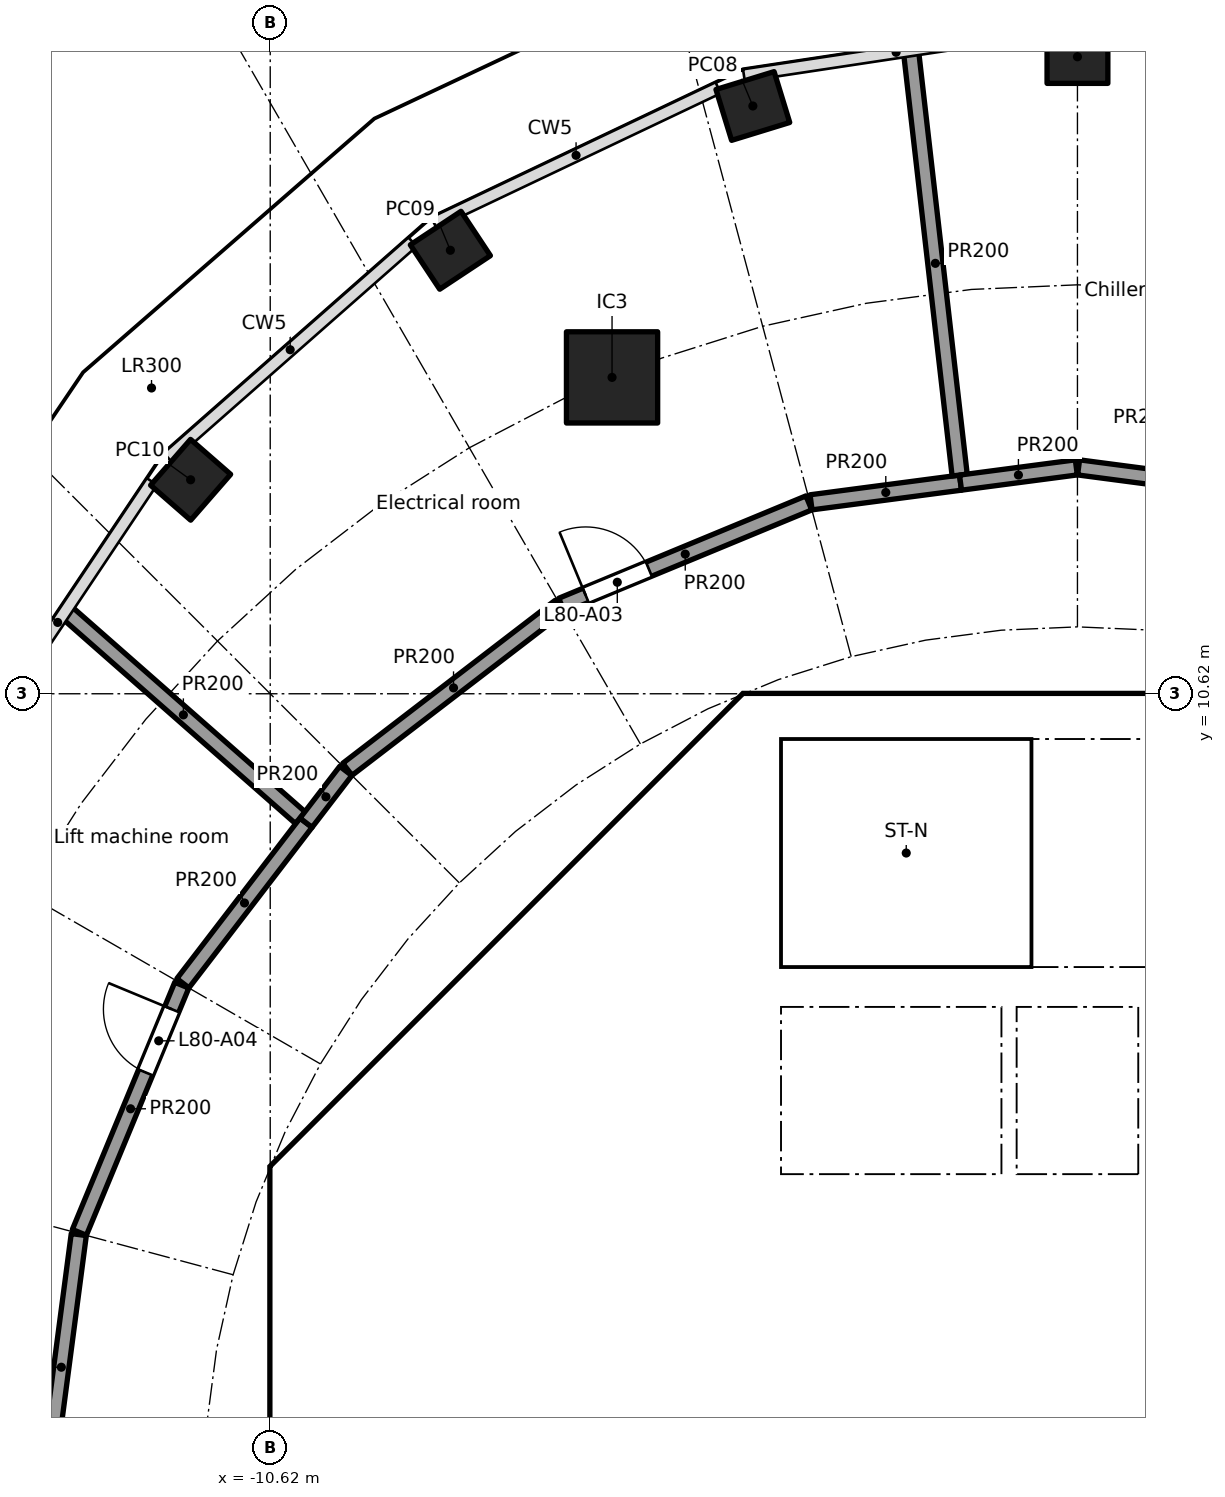
"""IFC4 building model, lengths in metres.
Left out: names, types, materials, properties, quantities, classifications, styles, units other than length and angle.
Written with IfcOpenShell. Run it as: python <this file> out.ifc"""

import sys

from ifc_helpers import new_model, si_unit, direction, frame, frame_2d, origin, origin_2d, place, context, subcontext, project, spatial, polyline, rectangle, hollow_rectangle, outline, extrude, element, fill, save


model = new_model("IFC4")
c1 = context("Model", 3, precision=1e-05, world=origin(), true_north=direction((0.0, 1.0)))
c2 = subcontext(c1, "Body", "Model", "MODEL_VIEW")
j1 = project(units=[si_unit("LENGTHUNIT", "METRE"), si_unit("PLANEANGLEUNIT", "RADIAN")], contexts=[c1])
p1 = place(None, origin())
s1 = spatial("IfcSite", under=j1, at=p1, CompositionType="ELEMENT")
p2 = place(p1, origin())
s2 = spatial("IfcBuilding", under=s1, at=p2, CompositionType="ELEMENT")
p3 = place(p2, frame((0.0, 0.0, 324.9)))
s3 = spatial("IfcBuildingStorey", under=s2, at=p3, CompositionType="ELEMENT", Elevation=324.9)
for number, where, z_axis, x_axis in (
    (1, (0.0, 19.0, 0.0), (0.0, 0.0, 1.0), (-1.0, 0.0, 0.0)),
    (2, (-4.271, 18.353, 0.0), (0.0, 0.0, 1.0), (-0.956, -0.294, 0.0)),
    (3, (-8.25, 16.455, 0.0), (0.0, 0.0, 1.0), (-0.834, -0.552, 0.0)),
    (4, (-11.667, 13.435, 0.0), (0.0, 0.0, 1.0), (-0.657, -0.754, 0.0)),
):
    element("IfcColumn", number, at=place(p3, frame(where, z_axis=z_axis, x_axis=x_axis)), inside=s3, PredefinedType="COLUMN", context=c2, shape_type="SweptSolid", body=[
        extrude(hollow_rectangle(XDim=0.8, YDim=0.7, WallThickness=0.025, at=origin_2d()), origin(), (0.0, 0.0, 1.0), 4.0),
    ])
p4 = place(p3, frame((-6.123, 14.782, 0.0), z_axis=(0.0, 0.0, 1.0), x_axis=(1.0, 0.0, 0.0)))
e5 = element("IfcColumn", 5, at=p4, inside=s3, PredefinedType="COLUMN", context=c2, shape_type="SweptSolid", body=[
    extrude(rectangle(XDim=1.2, YDim=1.2, at=origin_2d()), origin(), (0.0, 0.0, 1.0), 4.0),
])
p5 = place(p3, frame((-4.613, 9.988, 0.0), z_axis=(0.0, 0.0, 1.0), x_axis=(-0.707106781187, -0.707106781187, 0.0)))
e6 = element("IfcWall", 6, at=p5, inside=s3, PredefinedType="SHEAR", context=c2, shape_type="SweptSolid", body=[
    extrude(rectangle(XDim=7.602, YDim=0.6, at=frame_2d((3.801, 0.0))), origin(), (0.0, 0.0, 1.0), 3.7),
])
p6 = place(p5, frame((0.351, 0.0, 0.0)))
e7 = element("IfcOpeningElement", 7, at=p6, cuts=e6, PredefinedType="OPENING", context=c2, shape_type="SweptSolid", body=[
    extrude(rectangle(XDim=1.1, YDim=2.1, at=frame_2d((0.55, 1.05))), frame((0.0, 0.31, 0.0), z_axis=(0.0, -1.0, 0.0), x_axis=(1.0, 0.0, 0.0)), (0.0, 0.0, 1.0), 0.62),
])
p7 = place(p3, frame((-10.325, 3.801, 0.0), z_axis=(0.0, 0.0, 1.0), x_axis=(0.0, -1.0, 0.0)))
e8 = element("IfcWall", 8, at=p7, inside=s3, PredefinedType="SHEAR", context=c2, shape_type="SweptSolid", body=[
    extrude(rectangle(XDim=7.602, YDim=0.6, at=frame_2d((3.801, 0.0))), origin(), (0.0, 0.0, 1.0), 3.7),
])
p8 = place(p7, frame((0.651, 0.0, 0.0)))
e9 = element("IfcOpeningElement", 9, at=p8, cuts=e8, PredefinedType="OPENING", context=c2, shape_type="SweptSolid", body=[
    extrude(rectangle(XDim=1.5, YDim=2.1, at=frame_2d((0.75, 1.05))), frame((0.0, 0.31, 0.0), z_axis=(0.0, -1.0, 0.0), x_axis=(1.0, 0.0, 0.0)), (0.0, 0.0, 1.0), 0.62),
])
p9 = place(p7, frame((5.451, 0.0, 0.0)))
e10 = element("IfcOpeningElement", 10, at=p9, cuts=e8, PredefinedType="OPENING", context=c2, shape_type="SweptSolid", body=[
    extrude(rectangle(XDim=1.5, YDim=2.1, at=frame_2d((0.75, 1.05))), frame((0.0, 0.31, 0.0), z_axis=(0.0, -1.0, 0.0), x_axis=(1.0, 0.0, 0.0)), (0.0, 0.0, 1.0), 0.62),
])
p10 = place(p3, frame((-5.8, 4.3, 0.0), z_axis=(0.0, 0.0, 1.0), x_axis=(0.0, 1.0, 0.0)))
e11 = element("IfcWall", 11, at=p10, inside=s3, PredefinedType="PARTITIONING", context=c2, shape_type="SweptSolid", body=[
    extrude(rectangle(XDim=3.927, YDim=0.15, at=frame_2d((1.963, 0.0))), origin(), (0.0, 0.0, 1.0), 3.7),
])
p11 = place(p10, frame((0.262, 0.0, 0.0)))
e12 = element("IfcOpeningElement", 12, at=p11, cuts=e11, PredefinedType="OPENING", context=c2, shape_type="SweptSolid", body=[
    extrude(rectangle(XDim=0.9, YDim=2.1, at=frame_2d((0.45, 1.05))), frame((0.0, 0.085, 0.0), z_axis=(0.0, -1.0, 0.0), x_axis=(1.0, 0.0, 0.0)), (0.0, 0.0, 1.0), 0.17),
])
p12 = place(p10, frame((2.338, 0.0, 0.0)))
e13 = element("IfcOpeningElement", 13, at=p12, cuts=e11, PredefinedType="OPENING", context=c2, shape_type="SweptSolid", body=[
    extrude(rectangle(XDim=0.9, YDim=2.1, at=frame_2d((0.45, 1.05))), frame((0.0, 0.085, 0.0), z_axis=(0.0, -1.0, 0.0), x_axis=(1.0, 0.0, 0.0)), (0.0, 0.0, 1.0), 0.17),
])
p13 = place(p3, frame((-4.0, 4.3, 0.0), z_axis=(0.0, 0.0, 1.0), x_axis=(0.0, 1.0, 0.0)))
e14 = element("IfcWall", 14, at=p13, inside=s3, PredefinedType="SOLIDWALL", context=c2, shape_type="SweptSolid", body=[
    extrude(rectangle(XDim=2.2, YDim=0.2, at=frame_2d((1.1, 0.0))), origin(), (0.0, 0.0, 1.0), 3.7),
])
p14 = place(p13, frame((0.55, 0.0, 0.0)))
e15 = element("IfcOpeningElement", 15, at=p14, cuts=e14, PredefinedType="OPENING", context=c2, shape_type="SweptSolid", body=[
    extrude(rectangle(XDim=1.1, YDim=2.1, at=frame_2d((0.55, 1.05))), frame((0.0, 0.11, 0.0), z_axis=(0.0, -1.0, 0.0), x_axis=(1.0, 0.0, 0.0)), (0.0, 0.0, 1.0), 0.22),
])
p15 = place(p3, frame((-6.7, 2.0, 0.0), z_axis=(0.0, 0.0, 1.0), x_axis=(1.0, 0.0, 0.0)))
e16 = element("IfcWall", 16, at=p15, inside=s3, PredefinedType="SOLIDWALL", context=c2, shape_type="SweptSolid", body=[
    extrude(rectangle(XDim=13.4, YDim=0.2, at=frame_2d((6.7, 0.0))), origin(), (0.0, 0.0, 1.0), 3.7),
])
p16 = place(p15, frame((1.85, 0.0, 0.0)))
e17 = element("IfcOpeningElement", 17, at=p16, cuts=e16, PredefinedType="OPENING", context=c2, shape_type="SweptSolid", body=[
    extrude(rectangle(XDim=0.9, YDim=2.1, at=frame_2d((0.45, 1.05))), frame((0.0, 0.11, 0.0), z_axis=(0.0, -1.0, 0.0), x_axis=(1.0, 0.0, 0.0)), (0.0, 0.0, 1.0), 0.22),
])
p17 = place(p15, frame((5.15, 0.0, 0.0)))
e18 = element("IfcOpeningElement", 18, at=p17, cuts=e16, PredefinedType="OPENING", context=c2, shape_type="SweptSolid", body=[
    extrude(rectangle(XDim=0.9, YDim=2.1, at=frame_2d((0.45, 1.05))), frame((0.0, 0.11, 0.0), z_axis=(0.0, -1.0, 0.0), x_axis=(1.0, 0.0, 0.0)), (0.0, 0.0, 1.0), 0.22),
])
p18 = place(p15, frame((8.45, 0.0, 0.0)))
e19 = element("IfcOpeningElement", 19, at=p18, cuts=e16, PredefinedType="OPENING", context=c2, shape_type="SweptSolid", body=[
    extrude(rectangle(XDim=0.9, YDim=2.1, at=frame_2d((0.45, 1.05))), frame((0.0, 0.11, 0.0), z_axis=(0.0, -1.0, 0.0), x_axis=(1.0, 0.0, 0.0)), (0.0, 0.0, 1.0), 0.22),
])
p19 = place(p3, origin())
e20 = element("IfcWall", 20, at=p19, inside=s3, PredefinedType="SHEAR", context=c2, shape_type="SweptSolid", body=[
    extrude(outline(polyline([(-10.2, 4.825), (-9.776, 4.401), (-10.025, 4.152), (-10.025, 3.801), (-10.625, 3.801), (-10.625, 4.401), (-10.2, 4.825)])), origin(), (0.0, 0.0, 1.0), 3.7),
])
p20 = place(p3, origin())
e21 = element("IfcWall", 21, at=p20, inside=s3, PredefinedType="SHEAR", context=c2, shape_type="SweptSolid", body=[
    extrude(outline(polyline([(-4.152, 10.025), (-4.401, 9.776), (-4.825, 10.2), (-4.401, 10.625), (4.401, 10.625), (4.825, 10.2), (4.401, 9.776), (4.152, 10.025), (-4.152, 10.025)])), origin(), (0.0, 0.0, 1.0), 3.7),
])
p21 = place(p3, frame((-10.025, 4.0, 0.0), z_axis=(0.0, 0.0, 1.0), x_axis=(1.0, 0.0, 0.0)))
e22 = element("IfcWall", 22, at=p21, inside=s3, PredefinedType="PARTITIONING", context=c2, shape_type="SweptSolid", body=[
    extrude(rectangle(XDim=3.325, YDim=0.2, at=frame_2d((1.662, 0.0))), origin(), (0.0, 0.0, 1.0), 3.7),
])
p22 = place(p3, frame((-8.301, 5.8, 0.0), z_axis=(0.0, 0.0, 1.0), x_axis=(1.0, 0.0, 0.0)))
e23 = element("IfcWall", 23, at=p22, inside=s3, PredefinedType="PARTITIONING", context=c2, shape_type="SweptSolid", body=[
    extrude(rectangle(XDim=2.426, YDim=0.15, at=frame_2d((1.213, 0.0))), origin(), (0.0, 0.0, 1.0), 3.7),
])
for number, where, z_axis, x_axis in (
    (24, (-0.9, 4.3, 0.0), (0.0, 0.0, 1.0), (0.0, 1.0, 0.0)),
    (25, (0.9, 4.3, 0.0), (0.0, 0.0, 1.0), (0.0, 1.0, 0.0)),
):
    element("IfcWall", number, at=place(p3, frame(where, z_axis=z_axis, x_axis=x_axis)), inside=s3, PredefinedType="SOLIDWALL", context=c2, shape_type="SweptSolid", body=[
        extrude(rectangle(XDim=2.2, YDim=0.2, at=frame_2d((1.1, 0.0))), origin(), (0.0, 0.0, 1.0), 3.7),
    ])
p23 = place(p3, origin())
e26 = element("IfcWall", 26, at=p23, inside=s3, PredefinedType="SOLIDWALL", context=c2, shape_type="SweptSolid", body=[
    extrude(outline(polyline([(-6.7, 4.3), (6.7, 4.3), (6.7, 2.1), (6.5, 2.1), (6.5, 4.1), (4.5, 4.1), (4.5, 2.1), (4.3, 2.1), (4.3, 4.1), (0.1, 4.1), (0.1, 2.1), (-0.1, 2.1), (-0.1, 4.1), (-2.1, 4.1), (-2.1, 2.1), (-2.3, 2.1), (-2.3, 4.1), (-6.5, 4.1), (-6.5, 2.1), (-6.7, 2.1), (-6.7, 4.3)])), origin(), (0.0, 0.0, 1.0), 3.7),
])
p24 = place(p3, origin())
e27 = element("IfcWall", 27, at=p24, inside=s3, PredefinedType="SOLIDWALL", context=c2, shape_type="SweptSolid", body=[
    extrude(outline(polyline([(-3.9, 7.025), (-4.1, 7.025), (-4.1, 10.025), (-3.9, 10.025), (-3.9, 7.025)])), origin(), (0.0, 0.0, 1.0), 3.7),
])
p25 = place(p3, origin())
e28 = element("IfcWall", 28, at=p25, inside=s3, PredefinedType="SOLIDWALL", context=c2, shape_type="SweptSolid", body=[
    extrude(outline(polyline([(4.1, 6.5), (-4.1, 6.5), (-4.1, 7.025), (4.1, 7.025), (4.1, 6.5)])), origin(), (0.0, 0.0, 1.0), 3.7),
])
p26 = place(p3, frame((-13.598, 0.015, 0.0), z_axis=(0.0, 0.0, 1.0), x_axis=(0.130468866457, 0.991452406768, 0.0)))
e29 = element("IfcWall", 29, at=p26, inside=s3, PredefinedType="PARTITIONING", context=c2, shape_type="SweptSolid", body=[
    extrude(rectangle(XDim=3.52, YDim=0.2, at=frame_2d((1.76, 0.0))), origin(), (0.0, 0.0, 1.0), 3.7),
])
p27 = place(p3, frame((-13.131, 3.534, 0.0), z_axis=(0.0, 0.0, 1.0), x_axis=(0.382723413813, 0.92386297064, 0.0)))
e30 = element("IfcWall", 30, at=p27, inside=s3, PredefinedType="PARTITIONING", context=c2, shape_type="SweptSolid", body=[
    extrude(rectangle(XDim=3.52, YDim=0.2, at=frame_2d((1.76, 0.0))), origin(), (0.0, 0.0, 1.0), 3.7),
])
p28 = place(p27, frame((2.278, 0.0, 0.0)))
e31 = element("IfcOpeningElement", 31, at=p28, cuts=e30, PredefinedType="OPENING", context=c2, shape_type="SweptSolid", body=[
    extrude(rectangle(XDim=0.9, YDim=2.1, at=frame_2d((0.45, 1.05))), frame((0.0, 0.11, 0.0), z_axis=(0.0, -1.0, 0.0), x_axis=(1.0, 0.0, 0.0)), (0.0, 0.0, 1.0), 0.22),
])
p29 = place(p3, frame((-11.769, 6.812, 0.0), z_axis=(0.0, 0.0, 1.0), x_axis=(0.608699260048, 0.793401040343, 0.0)))
e32 = element("IfcWall", 32, at=p29, inside=s3, PredefinedType="PARTITIONING", context=c2, shape_type="SweptSolid", body=[
    extrude(rectangle(XDim=2.661, YDim=0.2, at=frame_2d((1.331, 0.0))), origin(), (0.0, 0.0, 1.0), 3.7),
])
p30 = place(p3, frame((-10.224, 8.989, 0.0), z_axis=(0.0, 0.0, 1.0), x_axis=(-0.750994766266, 0.660308156122, 0.0)))
e33 = element("IfcWall", 33, at=p30, inside=s3, PredefinedType="PARTITIONING", context=c2, shape_type="SweptSolid", body=[
    extrude(rectangle(XDim=4.097, YDim=0.2, at=frame_2d((2.049, 0.0))), origin(), (0.0, 0.0, 1.0), 3.7),
])
p31 = place(p3, frame((-10.149, 8.923, 0.0), z_axis=(0.0, 0.0, 1.0), x_axis=(0.608694005511, 0.793405071609, 0.0)))
e34 = element("IfcWall", 34, at=p31, inside=s3, PredefinedType="PARTITIONING", context=c2, shape_type="SweptSolid", body=[
    extrude(rectangle(XDim=0.859, YDim=0.2, at=frame_2d((0.43, 0.0))), origin(), (0.0, 0.0, 1.0), 3.7),
])
p32 = place(p3, frame((-9.605, 9.626, 0.0), z_axis=(0.0, 0.0, 1.0), x_axis=(0.793402024283, 0.608697977542, 0.0)))
e35 = element("IfcWall", 35, at=p32, inside=s3, PredefinedType="PARTITIONING", context=c2, shape_type="SweptSolid", body=[
    extrude(rectangle(XDim=3.52, YDim=0.2, at=frame_2d((1.76, 0.0))), origin(), (0.0, 0.0, 1.0), 3.7),
])
p33 = place(p3, frame((-6.786, 11.784, 0.0), z_axis=(0.0, 0.0, 1.0), x_axis=(0.92386297064, 0.382723413813, 0.0)))
e36 = element("IfcWall", 36, at=p33, inside=s3, PredefinedType="PARTITIONING", context=c2, shape_type="SweptSolid", body=[
    extrude(rectangle(XDim=3.52, YDim=0.2, at=frame_2d((1.76, 0.0))), origin(), (0.0, 0.0, 1.0), 3.7),
])
p34 = place(p33, frame((0.342, 0.0, 0.0)))
e37 = element("IfcOpeningElement", 37, at=p34, cuts=e36, PredefinedType="OPENING", context=c2, shape_type="SweptSolid", body=[
    extrude(rectangle(XDim=0.9, YDim=2.1, at=frame_2d((0.45, 1.05))), frame((0.0, 0.11, 0.0), z_axis=(0.0, -1.0, 0.0), x_axis=(1.0, 0.0, 0.0)), (0.0, 0.0, 1.0), 0.22),
])
p35 = place(p3, frame((-3.505, 13.139, 0.0), z_axis=(0.0, 0.0, 1.0), x_axis=(0.991454295543, 0.130454512571, 0.0)))
e38 = element("IfcWall", 38, at=p35, inside=s3, PredefinedType="PARTITIONING", context=c2, shape_type="SweptSolid", body=[
    extrude(rectangle(XDim=1.984, YDim=0.2, at=frame_2d((0.992, 0.0))), origin(), (0.0, 0.0, 1.0), 3.7),
])
p36 = place(p3, frame((-1.55, 13.497, 0.0), z_axis=(0.0, 0.0, 1.0), x_axis=(-0.114057329834, 0.993474169524, 0.0)))
e39 = element("IfcWall", 39, at=p36, inside=s3, PredefinedType="PARTITIONING", context=c2, shape_type="SweptSolid", body=[
    extrude(rectangle(XDim=5.608, YDim=0.2, at=frame_2d((2.804, 0.0))), origin(), (0.0, 0.0, 1.0), 3.7),
])
p37 = place(p3, frame((-1.538, 13.397, 0.0), z_axis=(0.0, 0.0, 1.0), x_axis=(0.991449967232, 0.13048740351, 0.0)))
e40 = element("IfcWall", 40, at=p37, inside=s3, PredefinedType="PARTITIONING", context=c2, shape_type="SweptSolid", body=[
    extrude(rectangle(XDim=1.536, YDim=0.2, at=frame_2d((0.768, 0.0))), origin(), (0.0, 0.0, 1.0), 3.7),
])
p38 = place(p3, frame((0.015, 13.598, 0.0), z_axis=(0.0, 0.0, 1.0), x_axis=(0.991452406768, -0.130468866457, 0.0)))
e41 = element("IfcWall", 41, at=p38, inside=s3, PredefinedType="PARTITIONING", context=c2, shape_type="SweptSolid", body=[
    extrude(rectangle(XDim=3.52, YDim=0.2, at=frame_2d((1.76, 0.0))), origin(), (0.0, 0.0, 1.0), 3.7),
])
p39 = place(p38, frame((1.16, 0.0, 0.0)))
e42 = element("IfcOpeningElement", 42, at=p39, cuts=e41, PredefinedType="OPENING", context=c2, shape_type="SweptSolid", body=[
    extrude(rectangle(XDim=1.2, YDim=2.1, at=frame_2d((0.6, 1.05))), frame((0.0, 0.11, 0.0), z_axis=(0.0, -1.0, 0.0), x_axis=(1.0, 0.0, 0.0)), (0.0, 0.0, 1.0), 0.22),
])
p40 = place(p14, origin())
e43 = element("IfcDoor", 43, at=p40, inside=s3, OperationType="DOUBLE_DOOR_SLIDING", PredefinedType="DOOR", context=c2, shape_type="SweptSolid", body=[
    extrude(rectangle(XDim=1.1, YDim=2.1, at=frame_2d((0.55, 1.05))), frame((0.0, 0.025, 0.0), z_axis=(0.0, -1.0, 0.0), x_axis=(1.0, 0.0, 0.0)), (0.0, 0.0, 1.0), 0.05),
])
fill(e15, e43)
p41 = place(p11, origin())
e44 = element("IfcDoor", 44, at=p41, inside=s3, OperationType="SINGLE_SWING_LEFT", PredefinedType="DOOR", context=c2, shape_type="SweptSolid", body=[
    extrude(rectangle(XDim=0.9, YDim=2.1, at=frame_2d((0.45, 1.05))), frame((0.0, 0.025, 0.0), z_axis=(0.0, -1.0, 0.0), x_axis=(1.0, 0.0, 0.0)), (0.0, 0.0, 1.0), 0.05),
])
fill(e12, e44)
p42 = place(p12, origin())
e45 = element("IfcDoor", 45, at=p42, inside=s3, OperationType="SINGLE_SWING_LEFT", PredefinedType="DOOR", context=c2, shape_type="SweptSolid", body=[
    extrude(rectangle(XDim=0.9, YDim=2.1, at=frame_2d((0.45, 1.05))), frame((0.0, 0.025, 0.0), z_axis=(0.0, -1.0, 0.0), x_axis=(1.0, 0.0, 0.0)), (0.0, 0.0, 1.0), 0.05),
])
fill(e13, e45)
p43 = place(p16, origin())
e46 = element("IfcDoor", 46, at=p43, inside=s3, OperationType="SINGLE_SWING_RIGHT", PredefinedType="DOOR", context=c2, shape_type="SweptSolid", body=[
    extrude(rectangle(XDim=0.9, YDim=2.1, at=frame_2d((0.45, 1.05))), frame((0.0, 0.025, 0.0), z_axis=(0.0, -1.0, 0.0), x_axis=(1.0, 0.0, 0.0)), (0.0, 0.0, 1.0), 0.05),
])
fill(e17, e46)
p44 = place(p17, origin())
e47 = element("IfcDoor", 47, at=p44, inside=s3, OperationType="SINGLE_SWING_RIGHT", PredefinedType="DOOR", context=c2, shape_type="SweptSolid", body=[
    extrude(rectangle(XDim=0.9, YDim=2.1, at=frame_2d((0.45, 1.05))), frame((0.0, 0.025, 0.0), z_axis=(0.0, -1.0, 0.0), x_axis=(1.0, 0.0, 0.0)), (0.0, 0.0, 1.0), 0.05),
])
fill(e18, e47)
p45 = place(p8, origin())
e48 = element("IfcDoor", 48, at=p45, inside=s3, OperationType="DOUBLE_DOOR_SINGLE_SWING", PredefinedType="DOOR", context=c2, shape_type="SweptSolid", body=[
    extrude(rectangle(XDim=1.5, YDim=2.1, at=frame_2d((0.75, 1.05))), frame((0.0, 0.025, 0.0), z_axis=(0.0, -1.0, 0.0), x_axis=(1.0, 0.0, 0.0)), (0.0, 0.0, 1.0), 0.05),
])
fill(e9, e48)
p46 = place(p6, origin())
e49 = element("IfcDoor", 49, at=p46, inside=s3, OperationType="SINGLE_SWING_LEFT", PredefinedType="DOOR", context=c2, shape_type="SweptSolid", body=[
    extrude(rectangle(XDim=1.1, YDim=2.1, at=frame_2d((0.55, 1.05))), frame((0.0, 0.025, 0.0), z_axis=(0.0, -1.0, 0.0), x_axis=(1.0, 0.0, 0.0)), (0.0, 0.0, 1.0), 0.05),
])
fill(e7, e49)
p47 = place(p34, origin())
e50 = element("IfcDoor", 50, at=p47, inside=s3, OperationType="SINGLE_SWING_LEFT", PredefinedType="DOOR", context=c2, shape_type="SweptSolid", body=[
    extrude(rectangle(XDim=0.9, YDim=2.1, at=frame_2d((0.45, 1.05))), frame((0.0, 0.025, 0.0), z_axis=(0.0, -1.0, 0.0), x_axis=(1.0, 0.0, 0.0)), (0.0, 0.0, 1.0), 0.05),
])
fill(e37, e50)
p48 = place(p28, origin())
e51 = element("IfcDoor", 51, at=p48, inside=s3, OperationType="SINGLE_SWING_RIGHT", PredefinedType="DOOR", context=c2, shape_type="SweptSolid", body=[
    extrude(rectangle(XDim=0.9, YDim=2.1, at=frame_2d((0.45, 1.05))), frame((0.0, 0.025, 0.0), z_axis=(0.0, -1.0, 0.0), x_axis=(1.0, 0.0, 0.0)), (0.0, 0.0, 1.0), 0.05),
])
fill(e31, e51)
save(model, sys.argv[1])
